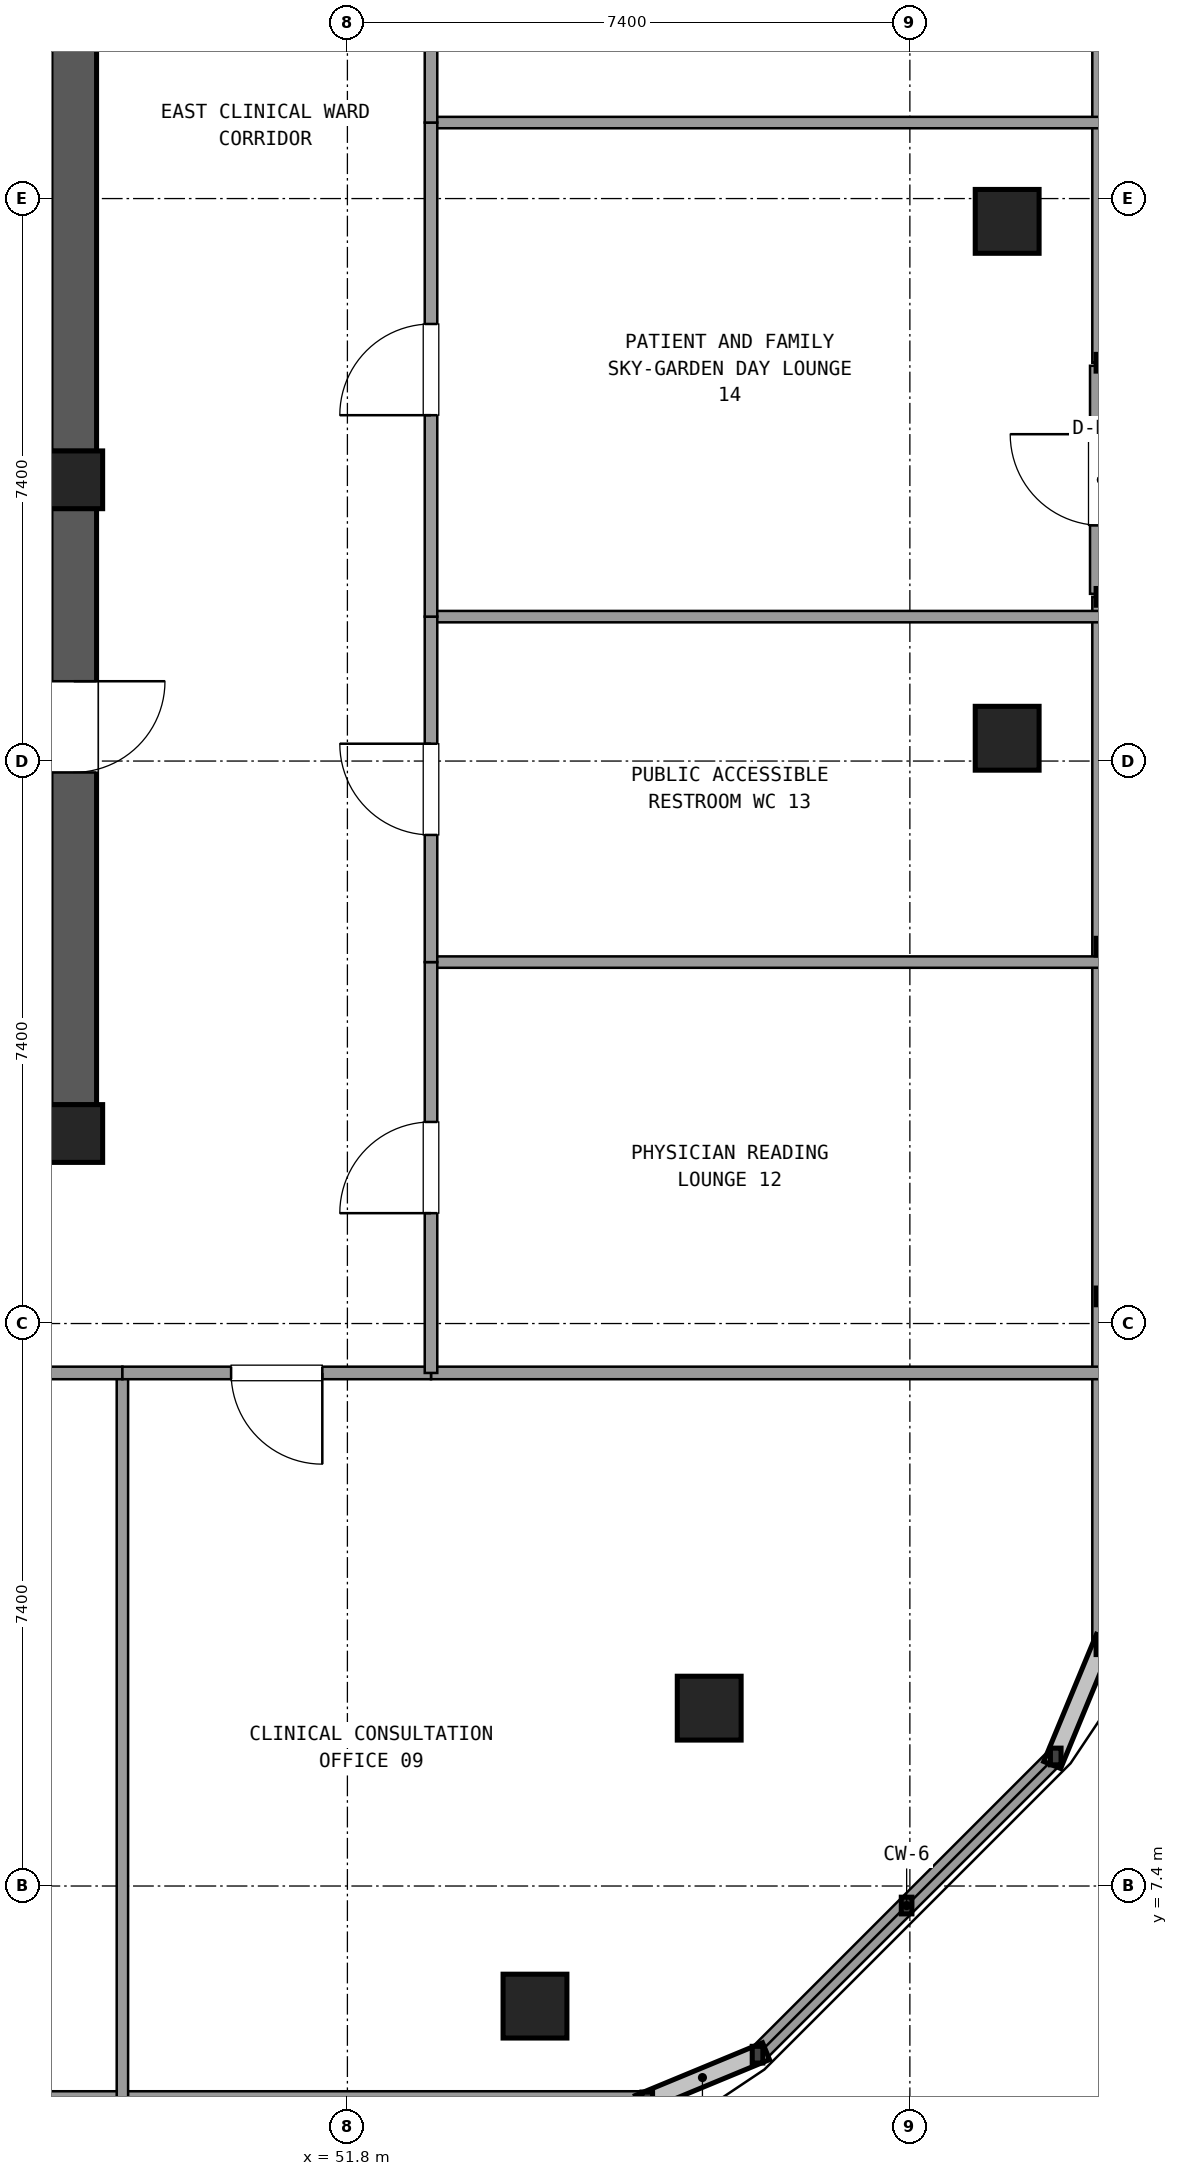
"""IFC4 building model, lengths in metres.
Left out: names, types, materials, properties, quantities, classifications, styles, units other than length and angle.
Written with IfcOpenShell. Run it as: python <this file> out.ifc"""

import sys

from ifc_helpers import new_model, si_unit, direction, frame, frame_2d, origin, origin_2d, place, context, subcontext, project, spatial, rectangle, extrude, element, fill, save


model = new_model("IFC4")
c1 = context("Model", 3, precision=1e-05, world=origin(), true_north=direction((0.0, 1.0)))
c2 = subcontext(c1, "Body", "Model", "MODEL_VIEW")
j1 = project(units=[si_unit("LENGTHUNIT", "METRE"), si_unit("PLANEANGLEUNIT", "RADIAN")], contexts=[c1])
p1 = place(None, origin())
s1 = spatial("IfcSite", under=j1, at=p1, CompositionType="ELEMENT")
p2 = place(p1, origin())
s2 = spatial("IfcBuilding", under=s1, at=p2, CompositionType="ELEMENT")
p3 = place(p2, frame((0.0, 0.0, 275.22)))
s3 = spatial("IfcBuildingStorey", under=s2, at=p3, CompositionType="ELEMENT", Elevation=275.22)
for number, where, z_axis, x_axis in (
    (1, (48.2, 17.3, 0.0), (0.0, 0.0, 1.0), (1.0, 0.0, 0.0)),
    (2, (48.2, 25.9, 0.0), (0.0, 0.0, 1.0), (1.0, 0.0, 0.0)),
):
    element("IfcColumn", number, at=place(p3, frame(where, z_axis=z_axis, x_axis=x_axis)), inside=s3, PredefinedType="COLUMN", context=c2, shape_type="SweptSolid", body=[
        extrude(rectangle(XDim=0.76, YDim=0.76, at=origin_2d()), origin(), (0.0, 0.0, 1.0), 3.6),
    ])
p4 = place(p3, frame((48.2, 17.675, 0.0), z_axis=(0.0, 0.0, 1.0), x_axis=(0.0, 1.0, 0.0)))
e3 = element("IfcWall", 3, at=p4, inside=s3, PredefinedType="SHEAR", context=c2, shape_type="SweptSolid", body=[
    extrude(rectangle(XDim=7.85, YDim=0.6, at=frame_2d((3.925, 0.0))), origin(), (0.0, 0.0, 1.0), 3.32),
])
p5 = place(p4, frame((4.375, 0.0, 0.0)))
e4 = element("IfcOpeningElement", 4, at=p5, cuts=e3, PredefinedType="OPENING", context=c2, shape_type="SweptSolid", body=[
    extrude(rectangle(XDim=1.2, YDim=2.15, at=frame_2d((0.6, 1.075))), frame((0.0, 0.31, 0.0), z_axis=(0.0, -1.0, 0.0), x_axis=(1.0, 0.0, 0.0)), (0.0, 0.0, 1.0), 0.62),
])
p6 = place(p3, frame((48.2, 26.275, 0.0), z_axis=(0.0, 0.0, 1.0), x_axis=(0.0, 1.0, 0.0)))
e5 = element("IfcWall", 5, at=p6, inside=s3, PredefinedType="SHEAR", context=c2, shape_type="SweptSolid", body=[
    extrude(rectangle(XDim=7.85, YDim=0.6, at=frame_2d((3.925, 0.0))), origin(), (0.0, 0.0, 1.0), 3.32),
])
for number, where, z_axis, x_axis in (
    (6, (54.268, 5.82, 0.0), (0.0, 0.0, 1.0), (1.0, 0.0, 0.0)),
    (7, (56.56, 9.74, 0.0), (0.0, 0.0, 1.0), (1.0, 0.0, 0.0)),
    (8, (60.48, 22.5, 0.0), (0.0, 0.0, 1.0), (1.0, 0.0, 0.0)),
    (9, (60.48, 29.3, 0.0), (0.0, 0.0, 1.0), (1.0, 0.0, 0.0)),
):
    element("IfcColumn", number, at=place(p3, frame(where, z_axis=z_axis, x_axis=x_axis)), inside=s3, PredefinedType="COLUMN", context=c2, shape_type="SweptSolid", body=[
        extrude(rectangle(XDim=0.84, YDim=0.84, at=origin_2d()), origin(), (0.0, 0.0, 1.0), 3.6),
    ])
p7 = place(p3, frame((18.255, 4.58, 0.0), z_axis=(0.0, 0.0, 1.0), x_axis=(1.0, 0.0, 0.0)))
e10 = element("IfcWall", 10, at=p7, inside=s3, PredefinedType="SOLIDWALL", context=c2, shape_type="SweptSolid", body=[
    extrude(rectangle(XDim=37.49, YDim=0.24, at=frame_2d((18.745, 0.0))), origin(), (0.0, 0.0, 1.0), 0.85),
])
p8 = place(p3, frame((57.196, 5.181, 0.0), z_axis=(0.0, 0.0, 1.0), x_axis=(0.707084777957, 0.707128783731, 0.0)))
e11 = element("IfcWall", 11, at=p8, inside=s3, PredefinedType="SOLIDWALL", context=c2, shape_type="SweptSolid", body=[
    extrude(rectangle(XDim=5.548, YDim=0.24, at=frame_2d((2.774, 0.0))), origin(), (0.0, 0.0, 1.0), 0.85),
])
p9 = place(p3, frame((61.72, 24.4, 0.0), z_axis=(0.0, 0.0, 1.0), x_axis=(0.0, 1.0, 0.0)))
e12 = element("IfcWall", 12, at=p9, inside=s3, PredefinedType="SOLIDWALL", context=c2, shape_type="SweptSolid", body=[
    extrude(rectangle(XDim=3.0, YDim=0.3, at=frame_2d((1.5, 0.0))), origin(), (0.0, 0.0, 1.0), 2.69),
])
p10 = place(p9, frame((0.9, 0.0, 0.0)))
e13 = element("IfcOpeningElement", 13, at=p10, cuts=e12, PredefinedType="OPENING", context=c2, shape_type="SweptSolid", body=[
    extrude(rectangle(XDim=1.2, YDim=2.2, at=frame_2d((0.6, 1.1))), frame((0.0, 0.16, 0.0), z_axis=(0.0, -1.0, 0.0), x_axis=(1.0, 0.0, 0.0)), (0.0, 0.0, 1.0), 0.32),
])
for number, where, z_axis, x_axis in (
    (14, (61.72, 10.555, 0.0), (0.0, 0.0, 1.0), (0.0, 1.0, 0.0)),
    (15, (61.72, 27.44, 0.0), (0.0, 0.0, 1.0), (0.0, 1.0, 0.0)),
):
    element("IfcWall", number, at=place(p3, frame(where, z_axis=z_axis, x_axis=x_axis)), inside=s3, PredefinedType="SOLIDWALL", context=c2, shape_type="SweptSolid", body=[
        extrude(rectangle(XDim=13.805, YDim=0.24, at=frame_2d((6.903, 0.0))), origin(), (0.0, 0.0, 1.0), 0.85),
    ])
p11 = place(p3, frame((52.9, 14.15, 0.0), z_axis=(0.0, 0.0, 1.0), x_axis=(1.0, 0.0, 0.0)))
e16 = element("IfcWall", 16, at=p11, inside=s3, PredefinedType="PARTITIONING", context=c2, shape_type="SweptSolid", body=[
    extrude(rectangle(XDim=8.8, YDim=0.165, at=frame_2d((4.4, 0.0))), origin(), (0.0, 0.0, 1.0), 2.61),
])
p12 = place(p3, frame((48.84, 14.15, 0.0), z_axis=(0.0, 0.0, 1.0), x_axis=(0.0, -1.0, 0.0)))
e17 = element("IfcWall", 17, at=p12, inside=s3, PredefinedType="PARTITIONING", context=c2, shape_type="SweptSolid", body=[
    extrude(rectangle(XDim=9.55, YDim=0.15, at=frame_2d((4.775, 0.0))), origin(), (0.0, 0.0, 1.0), 2.61),
])
p13 = place(p3, frame((42.077, 14.15, 0.0), z_axis=(0.0, 0.0, 1.0), x_axis=(1.0, 0.0, 0.0)))
e18 = element("IfcWall", 18, at=p13, inside=s3, PredefinedType="PARTITIONING", context=c2, shape_type="SweptSolid", body=[
    extrude(rectangle(XDim=6.763, YDim=0.165, at=frame_2d((3.382, 0.0))), origin(), (0.0, 0.0, 1.0), 2.61),
])
p14 = place(p13, frame((2.782, 0.0, 0.0)))
e19 = element("IfcOpeningElement", 19, at=p14, cuts=e18, PredefinedType="OPENING", context=c2, shape_type="SweptSolid", body=[
    extrude(rectangle(XDim=1.2, YDim=2.15, at=frame_2d((0.6, 1.075))), frame((0.0, 0.093, 0.0), z_axis=(0.0, -1.0, 0.0), x_axis=(1.0, 0.0, 0.0)), (0.0, 0.0, 1.0), 0.185),
])
p15 = place(p3, frame((48.84, 14.15, 0.0), z_axis=(0.0, 0.0, 1.0), x_axis=(1.0, 0.0, 0.0)))
e20 = element("IfcWall", 20, at=p15, inside=s3, PredefinedType="PARTITIONING", context=c2, shape_type="SweptSolid", body=[
    extrude(rectangle(XDim=4.06, YDim=0.165, at=frame_2d((2.03, 0.0))), origin(), (0.0, 0.0, 1.0), 2.61),
])
p16 = place(p15, frame((1.43, 0.0, 0.0)))
e21 = element("IfcOpeningElement", 21, at=p16, cuts=e20, PredefinedType="OPENING", context=c2, shape_type="SweptSolid", body=[
    extrude(rectangle(XDim=1.2, YDim=2.15, at=frame_2d((0.6, 1.075))), frame((0.0, 0.093, 0.0), z_axis=(0.0, -1.0, 0.0), x_axis=(1.0, 0.0, 0.0)), (0.0, 0.0, 1.0), 0.185),
])
p17 = place(p3, frame((52.9, 19.555, 0.0), z_axis=(0.0, 0.0, 1.0), x_axis=(1.0, 0.0, 0.0)))
e22 = element("IfcWall", 22, at=p17, inside=s3, PredefinedType="PARTITIONING", context=c2, shape_type="SweptSolid", body=[
    extrude(rectangle(XDim=8.8, YDim=0.15, at=frame_2d((4.4, 0.0))), origin(), (0.0, 0.0, 1.0), 2.61),
])
p18 = place(p3, frame((52.9, 14.15, 0.0), z_axis=(0.0, 0.0, 1.0), x_axis=(0.0, 1.0, 0.0)))
e23 = element("IfcWall", 23, at=p18, inside=s3, PredefinedType="PARTITIONING", context=c2, shape_type="SweptSolid", body=[
    extrude(rectangle(XDim=5.405, YDim=0.165, at=frame_2d((2.703, 0.0))), origin(), (0.0, 0.0, 1.0), 2.61),
])
p19 = place(p18, frame((2.102, 0.0, 0.0)))
e24 = element("IfcOpeningElement", 24, at=p19, cuts=e23, PredefinedType="OPENING", context=c2, shape_type="SweptSolid", body=[
    extrude(rectangle(XDim=1.2, YDim=2.15, at=frame_2d((0.6, 1.075))), frame((0.0, 0.093, 0.0), z_axis=(0.0, -1.0, 0.0), x_axis=(1.0, 0.0, 0.0)), (0.0, 0.0, 1.0), 0.185),
])
p20 = place(p3, frame((52.9, 24.1, 0.0), z_axis=(0.0, 0.0, 1.0), x_axis=(1.0, 0.0, 0.0)))
e25 = element("IfcWall", 25, at=p20, inside=s3, PredefinedType="PARTITIONING", context=c2, shape_type="SweptSolid", body=[
    extrude(rectangle(XDim=8.8, YDim=0.15, at=frame_2d((4.4, 0.0))), origin(), (0.0, 0.0, 1.0), 2.61),
])
p21 = place(p3, frame((52.9, 19.555, 0.0), z_axis=(0.0, 0.0, 1.0), x_axis=(0.0, 1.0, 0.0)))
e26 = element("IfcWall", 26, at=p21, inside=s3, PredefinedType="PARTITIONING", context=c2, shape_type="SweptSolid", body=[
    extrude(rectangle(XDim=4.545, YDim=0.165, at=frame_2d((2.272, 0.0))), origin(), (0.0, 0.0, 1.0), 2.61),
])
p22 = place(p21, frame((1.673, 0.0, 0.0)))
e27 = element("IfcOpeningElement", 27, at=p22, cuts=e26, PredefinedType="OPENING", context=c2, shape_type="SweptSolid", body=[
    extrude(rectangle(XDim=1.2, YDim=2.15, at=frame_2d((0.6, 1.075))), frame((0.0, 0.093, 0.0), z_axis=(0.0, -1.0, 0.0), x_axis=(1.0, 0.0, 0.0)), (0.0, 0.0, 1.0), 0.185),
])
p23 = place(p3, frame((52.9, 30.6, 0.0), z_axis=(0.0, 0.0, 1.0), x_axis=(1.0, 0.0, 0.0)))
e28 = element("IfcWall", 28, at=p23, inside=s3, PredefinedType="PARTITIONING", context=c2, shape_type="SweptSolid", body=[
    extrude(rectangle(XDim=8.8, YDim=0.15, at=frame_2d((4.4, 0.0))), origin(), (0.0, 0.0, 1.0), 2.61),
])
p24 = place(p3, frame((52.9, 24.1, 0.0), z_axis=(0.0, 0.0, 1.0), x_axis=(0.0, 1.0, 0.0)))
e29 = element("IfcWall", 29, at=p24, inside=s3, PredefinedType="PARTITIONING", context=c2, shape_type="SweptSolid", body=[
    extrude(rectangle(XDim=6.5, YDim=0.165, at=frame_2d((3.25, 0.0))), origin(), (0.0, 0.0, 1.0), 2.61),
])
p25 = place(p24, frame((2.65, 0.0, 0.0)))
e30 = element("IfcOpeningElement", 30, at=p25, cuts=e29, PredefinedType="OPENING", context=c2, shape_type="SweptSolid", body=[
    extrude(rectangle(XDim=1.2, YDim=2.15, at=frame_2d((0.6, 1.075))), frame((0.0, 0.093, 0.0), z_axis=(0.0, -1.0, 0.0), x_axis=(1.0, 0.0, 0.0)), (0.0, 0.0, 1.0), 0.185),
])
p26 = place(p3, frame((52.9, 30.6, 0.0), z_axis=(0.0, 0.0, 1.0), x_axis=(0.0, 1.0, 0.0)))
e31 = element("IfcWall", 31, at=p26, inside=s3, PredefinedType="PARTITIONING", context=c2, shape_type="SweptSolid", body=[
    extrude(rectangle(XDim=7.05, YDim=0.165, at=frame_2d((3.525, 0.0))), origin(), (0.0, 0.0, 1.0), 2.61),
])
p27 = place(p26, frame((2.925, 0.0, 0.0)))
e32 = element("IfcOpeningElement", 32, at=p27, cuts=e31, PredefinedType="OPENING", context=c2, shape_type="SweptSolid", body=[
    extrude(rectangle(XDim=1.2, YDim=2.15, at=frame_2d((0.6, 1.075))), frame((0.0, 0.093, 0.0), z_axis=(0.0, -1.0, 0.0), x_axis=(1.0, 0.0, 0.0)), (0.0, 0.0, 1.0), 0.185),
])
p28 = place(p5, frame((1.2, 0.0, 0.0), z_axis=(0.0, 0.0, 1.0), x_axis=(-1.0, 0.0, 0.0)))
e33 = element("IfcDoor", 33, at=p28, inside=s3, OperationType="SINGLE_SWING_RIGHT", PredefinedType="DOOR", context=c2, shape_type="SweptSolid", body=[
    extrude(rectangle(XDim=1.2, YDim=2.15, at=frame_2d((0.6, 1.075))), frame((0.0, 0.025, 0.0), z_axis=(0.0, -1.0, 0.0), x_axis=(1.0, 0.0, 0.0)), (0.0, 0.0, 1.0), 0.05),
])
fill(e4, e33)
p29 = place(p16, frame((1.2, 0.0, 0.0), z_axis=(0.0, 0.0, 1.0), x_axis=(-1.0, 0.0, 0.0)))
e34 = element("IfcDoor", 34, at=p29, inside=s3, OperationType="SINGLE_SWING_RIGHT", PredefinedType="DOOR", context=c2, shape_type="SweptSolid", body=[
    extrude(rectangle(XDim=1.2, YDim=2.15, at=frame_2d((0.6, 1.075))), frame((0.0, 0.025, 0.0), z_axis=(0.0, -1.0, 0.0), x_axis=(1.0, 0.0, 0.0)), (0.0, 0.0, 1.0), 0.05),
])
fill(e21, e34)
p30 = place(p19, origin())
e35 = element("IfcDoor", 35, at=p30, inside=s3, OperationType="SINGLE_SWING_LEFT", PredefinedType="DOOR", context=c2, shape_type="SweptSolid", body=[
    extrude(rectangle(XDim=1.2, YDim=2.15, at=frame_2d((0.6, 1.075))), frame((0.0, 0.025, 0.0), z_axis=(0.0, -1.0, 0.0), x_axis=(1.0, 0.0, 0.0)), (0.0, 0.0, 1.0), 0.05),
])
fill(e24, e35)
p31 = place(p22, origin())
e36 = element("IfcDoor", 36, at=p31, inside=s3, OperationType="SINGLE_SWING_RIGHT", PredefinedType="DOOR", context=c2, shape_type="SweptSolid", body=[
    extrude(rectangle(XDim=1.2, YDim=2.15, at=frame_2d((0.6, 1.075))), frame((0.0, 0.025, 0.0), z_axis=(0.0, -1.0, 0.0), x_axis=(1.0, 0.0, 0.0)), (0.0, 0.0, 1.0), 0.05),
])
fill(e27, e36)
p32 = place(p25, origin())
e37 = element("IfcDoor", 37, at=p32, inside=s3, OperationType="SINGLE_SWING_LEFT", PredefinedType="DOOR", context=c2, shape_type="SweptSolid", body=[
    extrude(rectangle(XDim=1.2, YDim=2.15, at=frame_2d((0.6, 1.075))), frame((0.0, 0.025, 0.0), z_axis=(0.0, -1.0, 0.0), x_axis=(1.0, 0.0, 0.0)), (0.0, 0.0, 1.0), 0.05),
])
fill(e30, e37)
save(model, sys.argv[1])
